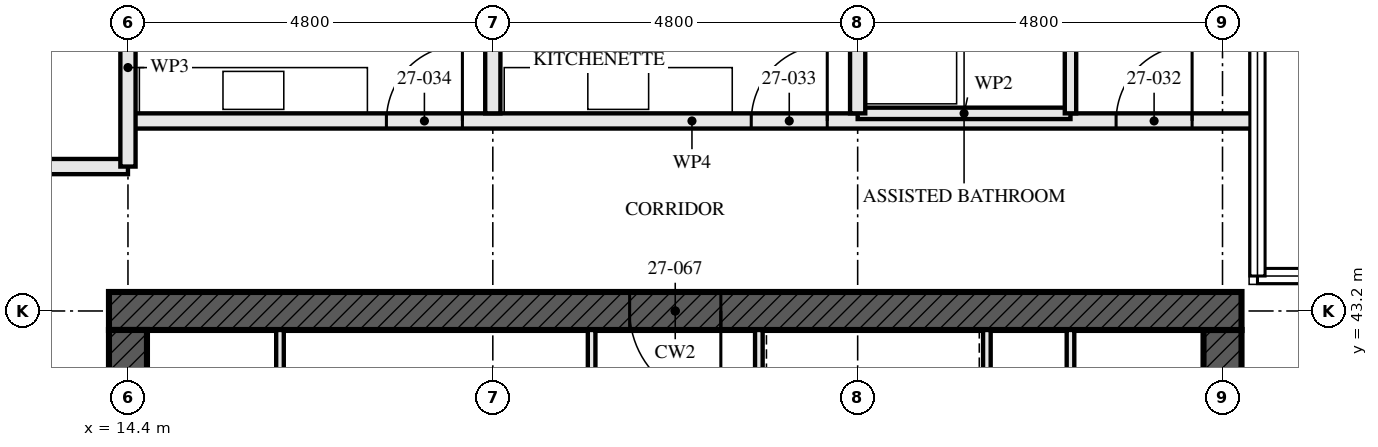
"""IFC4 building model, lengths in metres.
Left out: names, types, materials, properties, quantities, classifications, styles, units other than length and angle.
Written with IfcOpenShell. Run it as: python <this file> out.ifc"""

import sys

from ifc_helpers import new_model, si_unit, direction, frame, frame_2d, origin, place, context, subcontext, project, spatial, rectangle, extrude, element, fill, save


model = new_model("IFC4")
c1 = context("Model", 3, precision=1e-05, world=origin(), true_north=direction((0.0, 1.0)))
c2 = subcontext(c1, "Body", "Model", "MODEL_VIEW")
j1 = project(units=[si_unit("LENGTHUNIT", "METRE"), si_unit("PLANEANGLEUNIT", "RADIAN")], contexts=[c1])
p1 = place(None, origin())
s1 = spatial("IfcSite", under=j1, at=p1, CompositionType="ELEMENT")
p2 = place(p1, origin())
s2 = spatial("IfcBuilding", under=s1, at=p2, CompositionType="ELEMENT")
p3 = place(p2, frame((0.0, 0.0, 101.5)))
s3 = spatial("IfcBuildingStorey", under=s2, at=p3, CompositionType="ELEMENT", Elevation=101.5)
p4 = place(p3, frame((29.05, 43.2, -0.17), z_axis=(0.0, 0.0, 1.0), x_axis=(-1.0, 0.0, 0.0)))
e1 = element("IfcWall", 1, at=p4, inside=s3, PredefinedType="SHEAR", context=c2, shape_type="SweptSolid", body=[
    extrude(rectangle(XDim=14.9, YDim=0.5, at=frame_2d((7.45, 0.0))), origin(), (0.0, 0.0, 1.0), 3.5),
])
p5 = place(p4, frame((6.85, 0.0, 0.17)))
e2 = element("IfcOpeningElement", 2, at=p5, cuts=e1, PredefinedType="OPENING", context=c2, shape_type="SweptSolid", body=[
    extrude(rectangle(XDim=1.2, YDim=2.1, at=frame_2d((0.6, 1.05))), frame((0.0, 0.26, 0.0), z_axis=(0.0, -1.0, 0.0), x_axis=(1.0, 0.0, 0.0)), (0.0, 0.0, 1.0), 0.521),
])
p6 = place(p3, frame((14.4, 42.95, -0.17), z_axis=(0.0, 0.0, 1.0), x_axis=(0.0, -1.0, 0.0)))
e3 = element("IfcWall", 3, at=p6, inside=s3, PredefinedType="SHEAR", context=c2, shape_type="SweptSolid", body=[
    extrude(rectangle(XDim=13.9, YDim=0.5, at=frame_2d((6.95, 0.0))), origin(), (0.0, 0.0, 1.0), 3.5),
])
p7 = place(p6, frame((6.35, 0.0, 0.17)))
e4 = element("IfcOpeningElement", 4, at=p7, cuts=e3, PredefinedType="OPENING", context=c2, shape_type="SweptSolid", body=[
    extrude(rectangle(XDim=1.2, YDim=2.1, at=frame_2d((0.6, 1.05))), frame((0.0, 0.26, 0.0), z_axis=(0.0, -1.0, 0.0), x_axis=(1.0, 0.0, 0.0)), (0.0, 0.0, 1.0), 0.521),
])
p8 = place(p3, frame((28.8, 29.05, -0.17), z_axis=(0.0, 0.0, 1.0), x_axis=(0.0, 1.0, 0.0)))
e5 = element("IfcWall", 5, at=p8, inside=s3, PredefinedType="SHEAR", context=c2, shape_type="SweptSolid", body=[
    extrude(rectangle(XDim=13.9, YDim=0.5, at=frame_2d((6.95, 0.0))), origin(), (0.0, 0.0, 1.0), 3.5),
])
p9 = place(p8, frame((6.35, 0.0, 0.17)))
e6 = element("IfcOpeningElement", 6, at=p9, cuts=e5, PredefinedType="OPENING", context=c2, shape_type="SweptSolid", body=[
    extrude(rectangle(XDim=1.2, YDim=2.1, at=frame_2d((0.6, 1.05))), frame((0.0, 0.26, 0.0), z_axis=(0.0, -1.0, 0.0), x_axis=(1.0, 0.0, 0.0)), (0.0, 0.0, 1.0), 0.521),
])
p10 = place(p3, frame((14.4, 45.1, 0.0), z_axis=(0.0, 0.0, 1.0), x_axis=(-1.0, 0.0, 0.0)))
e7 = element("IfcWall", 7, at=p10, inside=s3, PredefinedType="PARTITIONING", context=c2, shape_type="SweptSolid", body=[
    extrude(rectangle(XDim=9.6, YDim=0.2, at=frame_2d((4.8, 0.0))), origin(), (0.0, 0.0, 1.0), 3.33),
])
p11 = place(p10, frame((5.2, 0.0, 0.0)))
e8 = element("IfcOpeningElement", 8, at=p11, cuts=e7, PredefinedType="OPENING", context=c2, shape_type="SweptSolid", body=[
    extrude(rectangle(XDim=1.0, YDim=2.1, at=frame_2d((0.5, 1.05))), frame((0.0, 0.111, 0.0), z_axis=(0.0, -1.0, 0.0), x_axis=(1.0, 0.0, 0.0)), (0.0, 0.0, 1.0), 0.221),
])
p12 = place(p3, frame((26.8, 48.8, 0.0), z_axis=(0.0, 0.0, 1.0), x_axis=(0.0, -1.0, 0.0)))
e9 = element("IfcWall", 9, at=p12, inside=s3, PredefinedType="PARTITIONING", context=c2, shape_type="SweptSolid", body=[
    extrude(rectangle(XDim=3.0, YDim=0.15, at=frame_2d((1.5, 0.0))), origin(), (0.0, 0.0, 1.0), 2.55),
])
p13 = place(p12, frame((1.05, 0.0, 0.0)))
e10 = element("IfcOpeningElement", 10, at=p13, cuts=e9, PredefinedType="OPENING", context=c2, shape_type="SweptSolid", body=[
    extrude(rectangle(XDim=0.9, YDim=2.1, at=frame_2d((0.45, 1.05))), frame((0.0, 0.085, 0.0), z_axis=(0.0, -1.0, 0.0), x_axis=(1.0, 0.0, 0.0)), (0.0, 0.0, 1.0), 0.171),
])
p14 = place(p3, frame((26.8, 45.8, 0.0), z_axis=(0.0, 0.0, 1.0), x_axis=(-1.0, 0.0, 0.0)))
e11 = element("IfcWall", 11, at=p14, inside=s3, PredefinedType="PARTITIONING", context=c2, shape_type="SweptSolid", body=[
    extrude(rectangle(XDim=2.8, YDim=0.15, at=frame_2d((1.4, 0.0))), origin(), (0.0, 0.0, 1.0), 3.33),
])
p15 = place(p3, frame((24.0, 52.48, 0.0), z_axis=(0.0, 0.0, 1.0), x_axis=(0.0, -1.0, 0.0)))
e12 = element("IfcWall", 12, at=p15, inside=s3, PredefinedType="PARTITIONING", context=c2, shape_type="SweptSolid", body=[
    extrude(rectangle(XDim=6.68, YDim=0.2, at=frame_2d((3.34, 0.0))), origin(), (0.0, 0.0, 1.0), 2.55),
])
p16 = place(p3, frame((19.2, 57.28, 0.0), z_axis=(0.0, 0.0, 1.0), x_axis=(0.0, -1.0, 0.0)))
e13 = element("IfcWall", 13, at=p16, inside=s3, PredefinedType="PARTITIONING", context=c2, shape_type="SweptSolid", body=[
    extrude(rectangle(XDim=11.48, YDim=0.2, at=frame_2d((5.74, 0.0))), origin(), (0.0, 0.0, 1.0), 2.55),
])
p17 = place(p3, frame((29.24, 45.7, 0.0), z_axis=(0.0, 0.0, 1.0), x_axis=(-1.0, 0.0, 0.0)))
e14 = element("IfcWall", 14, at=p17, inside=s3, PredefinedType="PARTITIONING", context=c2, shape_type="SweptSolid", body=[
    extrude(rectangle(XDim=14.84, YDim=0.2, at=frame_2d((7.42, 0.0))), origin(), (0.0, 0.0, 1.0), 2.32),
])
p18 = place(p17, frame((0.84, 0.0, 0.0)))
e15 = element("IfcOpeningElement", 15, at=p18, cuts=e14, PredefinedType="OPENING", context=c2, shape_type="SweptSolid", body=[
    extrude(rectangle(XDim=1.0, YDim=2.1, at=frame_2d((0.5, 1.05))), frame((0.0, 0.111, 0.0), z_axis=(0.0, -1.0, 0.0), x_axis=(1.0, 0.0, 0.0)), (0.0, 0.0, 1.0), 0.221),
])
p19 = place(p17, frame((5.64, 0.0, 0.0)))
e16 = element("IfcOpeningElement", 16, at=p19, cuts=e14, PredefinedType="OPENING", context=c2, shape_type="SweptSolid", body=[
    extrude(rectangle(XDim=1.0, YDim=2.1, at=frame_2d((0.5, 1.05))), frame((0.0, 0.111, 0.0), z_axis=(0.0, -1.0, 0.0), x_axis=(1.0, 0.0, 0.0)), (0.0, 0.0, 1.0), 0.221),
])
p20 = place(p17, frame((10.44, 0.0, 0.0)))
e17 = element("IfcOpeningElement", 17, at=p20, cuts=e14, PredefinedType="OPENING", context=c2, shape_type="SweptSolid", body=[
    extrude(rectangle(XDim=1.0, YDim=2.1, at=frame_2d((0.5, 1.05))), frame((0.0, 0.111, 0.0), z_axis=(0.0, -1.0, 0.0), x_axis=(1.0, 0.0, 0.0)), (0.0, 0.0, 1.0), 0.221),
])
for number, where, z_axis, x_axis in (
    (18, (16.4, 37.15, 0.0), (0.0, 0.0, 1.0), (0.0, 1.0, 0.0)),
    (19, (26.8, 37.15, 0.0), (0.0, 0.0, 1.0), (0.0, 1.0, 0.0)),
):
    element("IfcWall", number, at=place(p3, frame(where, z_axis=z_axis, x_axis=x_axis)), inside=s3, PredefinedType="SOLIDWALL", context=c2, shape_type="SweptSolid", body=[
        extrude(rectangle(XDim=5.8, YDim=0.1, at=frame_2d((2.9, 0.0))), origin(), (0.0, 0.0, 1.0), 3.33),
    ])
p21 = place(p3, frame((20.5, 37.15, 0.0), z_axis=(0.0, 0.0, 1.0), x_axis=(0.0, 1.0, 0.0)))
e20 = element("IfcWall", 20, at=p21, inside=s3, PredefinedType="SOLIDWALL", context=c2, shape_type="SweptSolid", body=[
    extrude(rectangle(XDim=5.8, YDim=0.1, at=frame_2d((2.9, 0.0))), origin(), (0.0, 0.0, 1.0), 3.33),
])
p22 = place(p21, frame((0.975, 0.0, 0.0)))
e21 = element("IfcOpeningElement", 21, at=p22, cuts=e20, PredefinedType="OPENING", context=c2, shape_type="SweptSolid", body=[
    extrude(rectangle(XDim=0.9, YDim=2.1, at=frame_2d((0.45, 1.05))), frame((0.0, 0.061, 0.0), z_axis=(0.0, -1.0, 0.0), x_axis=(1.0, 0.0, 0.0)), (0.0, 0.0, 1.0), 0.121),
])
p23 = place(p3, frame((22.7, 37.15, 0.0), z_axis=(0.0, 0.0, 1.0), x_axis=(0.0, 1.0, 0.0)))
e22 = element("IfcWall", 22, at=p23, inside=s3, PredefinedType="SOLIDWALL", context=c2, shape_type="SweptSolid", body=[
    extrude(rectangle(XDim=5.8, YDim=0.1, at=frame_2d((2.9, 0.0))), origin(), (0.0, 0.0, 1.0), 3.33),
])
p24 = place(p23, frame((0.925, 0.0, 0.0)))
e23 = element("IfcOpeningElement", 23, at=p24, cuts=e22, PredefinedType="OPENING", context=c2, shape_type="SweptSolid", body=[
    extrude(rectangle(XDim=1.0, YDim=2.1, at=frame_2d((0.5, 1.05))), frame((0.0, 0.061, 0.0), z_axis=(0.0, -1.0, 0.0), x_axis=(1.0, 0.0, 0.0)), (0.0, 0.0, 1.0), 0.121),
])
p25 = place(p23, frame((3.9, 0.0, 0.0)))
e24 = element("IfcOpeningElement", 24, at=p25, cuts=e22, PredefinedType="OPENING", context=c2, shape_type="SweptSolid", body=[
    extrude(rectangle(XDim=1.0, YDim=2.1, at=frame_2d((0.5, 1.05))), frame((0.0, 0.061, 0.0), z_axis=(0.0, -1.0, 0.0), x_axis=(1.0, 0.0, 0.0)), (0.0, 0.0, 1.0), 0.121),
])
p26 = place(p3, frame((25.7, 37.15, 0.0), z_axis=(0.0, 0.0, 1.0), x_axis=(0.0, 1.0, 0.0)))
e25 = element("IfcWall", 25, at=p26, inside=s3, PredefinedType="SOLIDWALL", context=c2, shape_type="SweptSolid", body=[
    extrude(rectangle(XDim=5.8, YDim=0.1, at=frame_2d((2.9, 0.0))), origin(), (0.0, 0.0, 1.0), 3.33),
])
p27 = place(p3, frame((14.4, 45.1, 0.0), z_axis=(0.0, 0.0, 1.0), x_axis=(0.0, 1.0, 0.0)))
e26 = element("IfcWall", 26, at=p27, inside=s3, PredefinedType="PARTITIONING", context=c2, shape_type="SweptSolid", body=[
    extrude(rectangle(XDim=2.605, YDim=0.2, at=frame_2d((1.302, 0.0))), origin(), (0.0, 0.0, 1.0), 2.32),
])
p28 = place(p18, frame((1.0, 0.0, 0.0), z_axis=(0.0, 0.0, 1.0), x_axis=(-1.0, 0.0, 0.0)))
e27 = element("IfcDoor", 27, at=p28, inside=s3, OperationType="SINGLE_SWING_LEFT", PredefinedType="DOOR", context=c2, shape_type="SweptSolid", body=[
    extrude(rectangle(XDim=1.0, YDim=2.1, at=frame_2d((0.5, 1.05))), frame((0.0, 0.027, 0.0), z_axis=(0.0, -1.0, 0.0), x_axis=(1.0, 0.0, 0.0)), (0.0, 0.0, 1.0), 0.054),
])
fill(e15, e27)
p29 = place(p19, frame((1.0, 0.0, 0.0), z_axis=(0.0, 0.0, 1.0), x_axis=(-1.0, 0.0, 0.0)))
e28 = element("IfcDoor", 28, at=p29, inside=s3, OperationType="SINGLE_SWING_LEFT", PredefinedType="DOOR", context=c2, shape_type="SweptSolid", body=[
    extrude(rectangle(XDim=1.0, YDim=2.1, at=frame_2d((0.5, 1.05))), frame((0.0, 0.027, 0.0), z_axis=(0.0, -1.0, 0.0), x_axis=(1.0, 0.0, 0.0)), (0.0, 0.0, 1.0), 0.054),
])
fill(e16, e28)
p30 = place(p20, frame((1.0, 0.0, 0.0), z_axis=(0.0, 0.0, 1.0), x_axis=(-1.0, 0.0, 0.0)))
e29 = element("IfcDoor", 29, at=p30, inside=s3, OperationType="SINGLE_SWING_LEFT", PredefinedType="DOOR", context=c2, shape_type="SweptSolid", body=[
    extrude(rectangle(XDim=1.0, YDim=2.1, at=frame_2d((0.5, 1.05))), frame((0.0, 0.027, 0.0), z_axis=(0.0, -1.0, 0.0), x_axis=(1.0, 0.0, 0.0)), (0.0, 0.0, 1.0), 0.054),
])
fill(e17, e29)
p31 = place(p5, origin())
e30 = element("IfcDoor", 30, at=p31, inside=s3, OperationType="SINGLE_SWING_LEFT", PredefinedType="DOOR", context=c2, shape_type="SweptSolid", body=[
    extrude(rectangle(XDim=1.2, YDim=2.1, at=frame_2d((0.6, 1.05))), frame((0.0, 0.027, 0.0), z_axis=(0.0, -1.0, 0.0), x_axis=(1.0, 0.0, 0.0)), (0.0, 0.0, 1.0), 0.054),
])
fill(e2, e30)
save(model, sys.argv[1])
